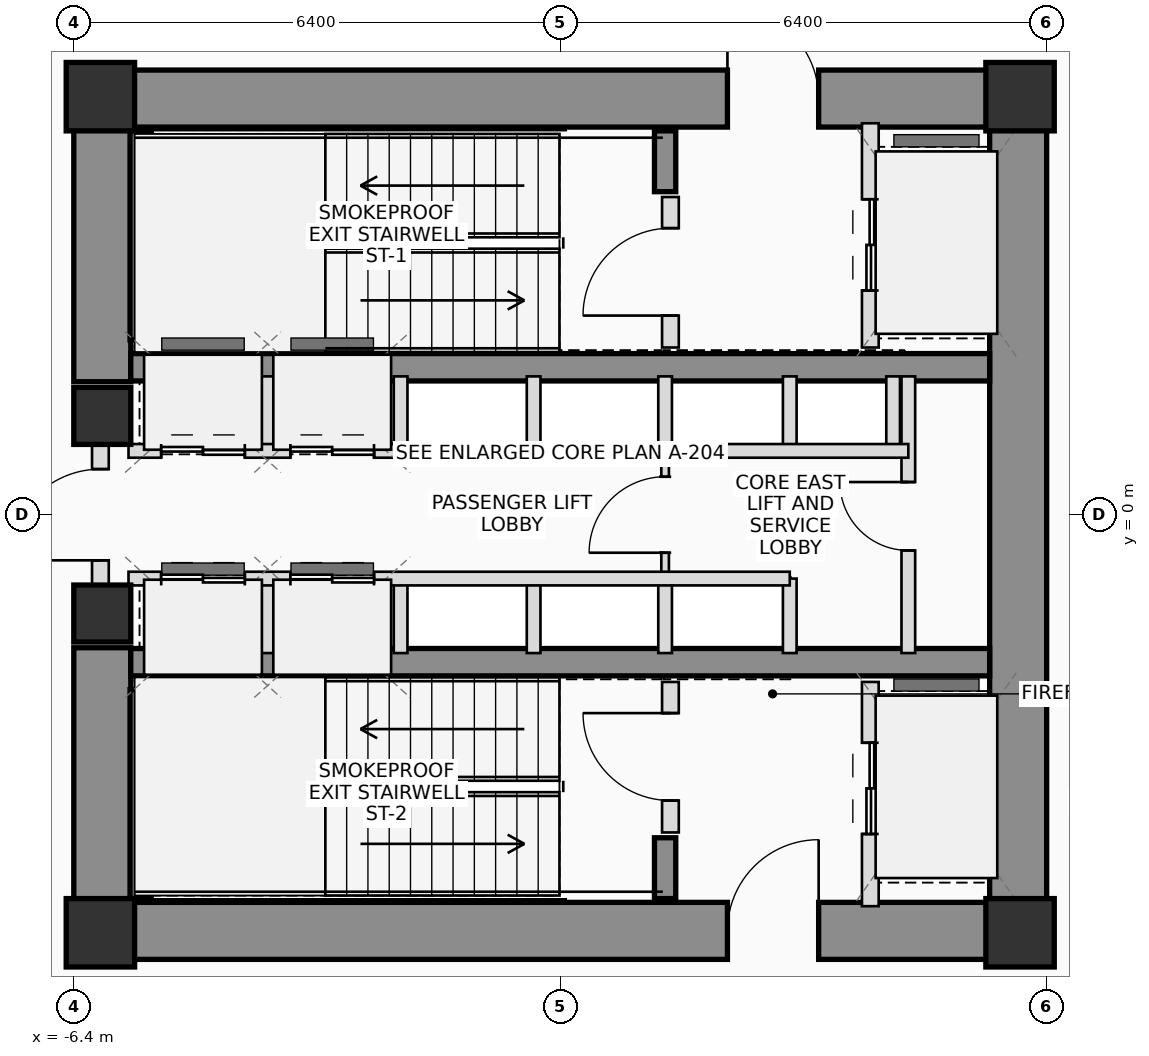
"""IFC4 building model, lengths in metres.
Left out: names, types, materials, properties, quantities, classifications, styles, units other than length and angle.
Written with IfcOpenShell. Run it as: python <this file> out.ifc"""

import sys

from ifc_helpers import new_model, si_unit, direction, frame, frame_2d, origin, origin_2d, place, context, subcontext, project, spatial, rectangle, extrude, source, transform, mapped, element, fill, save


model = new_model("IFC4")
c1 = context("Model", 3, precision=1e-05, world=origin(), true_north=direction((0.0, 1.0)))
c2 = subcontext(c1, "Body", "Model", "MODEL_VIEW")
j1 = project(units=[si_unit("LENGTHUNIT", "METRE"), si_unit("PLANEANGLEUNIT", "RADIAN")], contexts=[c1])
p1 = place(None, origin())
s1 = spatial("IfcSite", under=j1, at=p1, CompositionType="ELEMENT")
p2 = place(p1, origin())
s2 = spatial("IfcBuilding", under=s1, at=p2, CompositionType="ELEMENT")
p3 = place(p2, frame((0.0, 0.0, 31.2)))
s3 = spatial("IfcBuildingStorey", under=s2, at=p3, CompositionType="ELEMENT", Elevation=31.2)
m1 = source(origin(), c2, "Body", "SweptSolid", [
    extrude(rectangle(XDim=0.9, YDim=0.9, at=origin_2d()), origin(), (0.0, 0.0, 1.0), 3.7),
])
for number, where, z_axis, x_axis in (
    (1, (-6.05, -5.5, 0.0), (0.0, 0.0, 1.0), (1.0, 0.0, 0.0)),
    (2, (6.05, -5.5, 0.0), (0.0, 0.0, 1.0), (1.0, 0.0, 0.0)),
    (3, (6.05, 5.5, 0.0), (0.0, 0.0, 1.0), (1.0, 0.0, 0.0)),
    (4, (-6.05, 5.5, 0.0), (0.0, 0.0, 1.0), (1.0, 0.0, 0.0)),
):
    element("IfcColumn", number, at=place(p3, frame(where, z_axis=z_axis, x_axis=x_axis)), inside=s3, PredefinedType="COLUMN", context=c2, shape_type="MappedRepresentation", body=[
        mapped(m1, transform((0.0, 0.0, 0.0), scale=1.0)),
    ])
p4 = place(p3, frame((-6.4, 5.475, 0.0), z_axis=(0.0, 0.0, 1.0), x_axis=(1.0, 0.0, 0.0)))
e5 = element("IfcWall", 5, at=p4, inside=s3, PredefinedType="SHEAR", context=c2, shape_type="SweptSolid", body=[
    extrude(rectangle(XDim=12.8, YDim=0.75, at=frame_2d((6.4, 0.0))), origin(), (0.0, 0.0, 1.0), 3.7),
])
p5 = place(p4, frame((8.6, 0.0, 0.0)))
e6 = element("IfcOpeningElement", 6, at=p5, cuts=e5, PredefinedType="OPENING", context=c2, shape_type="SweptSolid", body=[
    extrude(rectangle(XDim=1.2, YDim=2.2, at=frame_2d((0.6, 1.1))), frame((0.0, 0.385, 0.0), z_axis=(0.0, -1.0, 0.0), x_axis=(1.0, 0.0, 0.0)), (0.0, 0.0, 1.0), 0.77),
])
p6 = place(p3, frame((-6.4, -5.475, 0.0), z_axis=(0.0, 0.0, 1.0), x_axis=(1.0, 0.0, 0.0)))
e7 = element("IfcWall", 7, at=p6, inside=s3, PredefinedType="SHEAR", context=c2, shape_type="SweptSolid", body=[
    extrude(rectangle(XDim=12.8, YDim=0.75, at=frame_2d((6.4, 0.0))), origin(), (0.0, 0.0, 1.0), 3.7),
])
p7 = place(p6, frame((8.6, 0.0, 0.0)))
e8 = element("IfcOpeningElement", 8, at=p7, cuts=e7, PredefinedType="OPENING", context=c2, shape_type="SweptSolid", body=[
    extrude(rectangle(XDim=1.2, YDim=2.2, at=frame_2d((0.6, 1.1))), frame((0.0, 0.385, 0.0), z_axis=(0.0, -1.0, 0.0), x_axis=(1.0, 0.0, 0.0)), (0.0, 0.0, 1.0), 0.77),
])
p8 = place(p3, frame((6.025, -5.1, 0.0), z_axis=(0.0, 0.0, 1.0), x_axis=(0.0, 1.0, 0.0)))
e9 = element("IfcWall", 9, at=p8, inside=s3, PredefinedType="SHEAR", context=c2, shape_type="SweptSolid", body=[
    extrude(rectangle(XDim=10.2, YDim=0.75, at=frame_2d((5.1, 0.0))), origin(), (0.0, 0.0, 1.0), 3.7),
])
for number, where, z_axis, x_axis in (
    (10, (-6.025, -5.1, 0.0), (0.0, 0.0, 1.0), (0.0, 1.0, 0.0)),
    (11, (-6.025, 1.75, 0.0), (0.0, 0.0, 1.0), (0.0, 1.0, 0.0)),
):
    element("IfcWall", number, at=place(p3, frame(where, z_axis=z_axis, x_axis=x_axis)), inside=s3, PredefinedType="SHEAR", context=c2, shape_type="SweptSolid", body=[
        extrude(rectangle(XDim=3.35, YDim=0.75, at=frame_2d((1.675, 0.0))), origin(), (0.0, 0.0, 1.0), 3.7),
    ])
for number, where, z_axis, x_axis in (
    (12, (-5.65, 1.94, 0.0), (0.0, 0.0, 1.0), (1.0, 0.0, 0.0)),
    (13, (-5.65, -1.94, 0.0), (0.0, 0.0, 1.0), (1.0, 0.0, 0.0)),
):
    element("IfcWall", number, at=place(p3, frame(where, z_axis=z_axis, x_axis=x_axis)), inside=s3, PredefinedType="SHEAR", context=c2, shape_type="SweptSolid", body=[
        extrude(rectangle(XDim=11.3, YDim=0.36, at=frame_2d((5.65, 0.0))), origin(), (0.0, 0.0, 1.0), 3.7),
    ])
p9 = place(p3, frame((-5.52, 2.3, 0.0), z_axis=(0.0, 0.0, 1.0), x_axis=(0.0, 1.0, 0.0)))
e14 = element("IfcWall", 14, at=p9, inside=s3, PredefinedType="SHEAR", context=c2, shape_type="SweptSolid", body=[
    extrude(rectangle(XDim=2.75, YDim=0.28, at=frame_2d((1.375, 0.0))), origin(), (0.0, 0.0, 1.0), 3.7),
])
p10 = place(p3, frame((1.38, 4.25, 0.0), z_axis=(0.0, 0.0, 1.0), x_axis=(0.0, 1.0, 0.0)))
e15 = element("IfcWall", 15, at=p10, inside=s3, PredefinedType="SHEAR", context=c2, shape_type="SweptSolid", body=[
    extrude(rectangle(XDim=0.8, YDim=0.28, at=frame_2d((0.4, 0.0))), origin(), (0.0, 0.0, 1.0), 3.7),
])
p11 = place(p3, frame((-5.52, -5.05, 0.0), z_axis=(0.0, 0.0, 1.0), x_axis=(0.0, 1.0, 0.0)))
e16 = element("IfcWall", 16, at=p11, inside=s3, PredefinedType="SHEAR", context=c2, shape_type="SweptSolid", body=[
    extrude(rectangle(XDim=2.75, YDim=0.28, at=frame_2d((1.375, 0.0))), origin(), (0.0, 0.0, 1.0), 3.7),
])
p12 = place(p3, frame((1.38, -5.05, 0.0), z_axis=(0.0, 0.0, 1.0), x_axis=(0.0, 1.0, 0.0)))
e17 = element("IfcWall", 17, at=p12, inside=s3, PredefinedType="SHEAR", context=c2, shape_type="SweptSolid", body=[
    extrude(rectangle(XDim=0.8, YDim=0.28, at=frame_2d((0.4, 0.0))), origin(), (0.0, 0.0, 1.0), 3.7),
])
m2 = source(origin(), c2, "Body", "SweptSolid", [
    extrude(rectangle(XDim=0.75, YDim=0.75, at=origin_2d()), origin(), (0.0, 0.0, 1.0), 3.7),
])
for number, where, z_axis, x_axis in (
    (18, (-6.025, -1.3, 0.0), (0.0, 0.0, 1.0), (1.0, 0.0, 0.0)),
    (19, (-6.025, 1.3, 0.0), (0.0, 0.0, 1.0), (1.0, 0.0, 0.0)),
):
    element("IfcColumn", number, at=place(p3, frame(where, z_axis=z_axis, x_axis=x_axis)), inside=s3, PredefinedType="COLUMN", context=c2, shape_type="MappedRepresentation", body=[
        mapped(m2, transform((0.0, 0.0, 0.0), scale=1.0)),
    ])
p13 = place(p3, frame((-6.05, -0.95, 0.0), z_axis=(0.0, 0.0, 1.0), x_axis=(0.0, 1.0, 0.0)))
e20 = element("IfcWall", 20, at=p13, inside=s3, PredefinedType="PLUMBINGWALL", context=c2, shape_type="SweptSolid", body=[
    extrude(rectangle(XDim=1.9, YDim=0.22, at=frame_2d((0.95, 0.0))), origin(), (0.0, 0.0, 1.0), 2.475),
])
p14 = place(p13, frame((0.35, 0.0, 0.0)))
e21 = element("IfcOpeningElement", 21, at=p14, cuts=e20, PredefinedType="OPENING", context=c2, shape_type="SweptSolid", body=[
    extrude(rectangle(XDim=1.2, YDim=2.2, at=frame_2d((0.6, 1.1))), frame((0.0, 0.12, 0.0), z_axis=(0.0, -1.0, 0.0), x_axis=(1.0, 0.0, 0.0)), (0.0, 0.0, 1.0), 0.24),
])
p15 = place(p3, frame((1.45, 2.2, 0.0), z_axis=(0.0, 0.0, 1.0), x_axis=(0.0, 1.0, 0.0)))
e22 = element("IfcWall", 22, at=p15, inside=s3, PredefinedType="PLUMBINGWALL", context=c2, shape_type="SweptSolid", body=[
    extrude(rectangle(XDim=1.98, YDim=0.22, at=frame_2d((0.99, 0.0))), origin(), (0.0, 0.0, 1.0), 3.495),
])
p16 = place(p15, frame((0.42, 0.0, 0.0)))
e23 = element("IfcOpeningElement", 23, at=p16, cuts=e22, PredefinedType="OPENING", context=c2, shape_type="SweptSolid", body=[
    extrude(rectangle(XDim=1.15, YDim=2.15, at=frame_2d((0.575, 1.075))), frame((0.0, 0.12, 0.0), z_axis=(0.0, -1.0, 0.0), x_axis=(1.0, 0.0, 0.0)), (0.0, 0.0, 1.0), 0.24),
])
p17 = place(p3, frame((4.08, 2.2, 0.0), z_axis=(0.0, 0.0, 1.0), x_axis=(0.0, 1.0, 0.0)))
e24 = element("IfcWall", 24, at=p17, inside=s3, PredefinedType="PLUMBINGWALL", context=c2, shape_type="SweptSolid", body=[
    extrude(rectangle(XDim=2.95, YDim=0.22, at=frame_2d((1.475, 0.0))), origin(), (0.0, 0.0, 1.0), 3.495),
])
p18 = place(p17, frame((0.75, 0.0, 0.0)))
e25 = element("IfcOpeningElement", 25, at=p18, cuts=e24, PredefinedType="OPENING", context=c2, shape_type="SweptSolid", body=[
    extrude(rectangle(XDim=1.2, YDim=2.25, at=frame_2d((0.6, 1.125))), frame((0.0, 0.12, 0.0), z_axis=(0.0, -1.0, 0.0), x_axis=(1.0, 0.0, 0.0)), (0.0, 0.0, 1.0), 0.24),
])
p19 = place(p3, frame((1.45, -4.18, 0.0), z_axis=(0.0, 0.0, 1.0), x_axis=(0.0, 1.0, 0.0)))
e26 = element("IfcWall", 26, at=p19, inside=s3, PredefinedType="PLUMBINGWALL", context=c2, shape_type="SweptSolid", body=[
    extrude(rectangle(XDim=1.98, YDim=0.22, at=frame_2d((0.99, 0.0))), origin(), (0.0, 0.0, 1.0), 3.495),
])
p20 = place(p19, frame((0.42, 0.0, 0.0)))
e27 = element("IfcOpeningElement", 27, at=p20, cuts=e26, PredefinedType="OPENING", context=c2, shape_type="SweptSolid", body=[
    extrude(rectangle(XDim=1.15, YDim=2.15, at=frame_2d((0.575, 1.075))), frame((0.0, 0.12, 0.0), z_axis=(0.0, -1.0, 0.0), x_axis=(1.0, 0.0, 0.0)), (0.0, 0.0, 1.0), 0.24),
])
p21 = place(p3, frame((4.08, -5.15, 0.0), z_axis=(0.0, 0.0, 1.0), x_axis=(0.0, 1.0, 0.0)))
e28 = element("IfcWall", 28, at=p21, inside=s3, PredefinedType="PLUMBINGWALL", context=c2, shape_type="SweptSolid", body=[
    extrude(rectangle(XDim=2.95, YDim=0.22, at=frame_2d((1.475, 0.0))), origin(), (0.0, 0.0, 1.0), 3.495),
])
p22 = place(p21, frame((0.95, 0.0, 0.0)))
e29 = element("IfcOpeningElement", 29, at=p22, cuts=e28, PredefinedType="OPENING", context=c2, shape_type="SweptSolid", body=[
    extrude(rectangle(XDim=1.2, YDim=2.25, at=frame_2d((0.6, 1.125))), frame((0.0, 0.12, 0.0), z_axis=(0.0, -1.0, 0.0), x_axis=(1.0, 0.0, 0.0)), (0.0, 0.0, 1.0), 0.24),
])
p23 = place(p3, frame((1.38, -0.84, 0.0), z_axis=(0.0, 0.0, 1.0), x_axis=(0.0, 1.0, 0.0)))
e30 = element("IfcWall", 30, at=p23, inside=s3, PredefinedType="PARTITIONING", context=c2, shape_type="SweptSolid", body=[
    extrude(rectangle(XDim=1.68, YDim=0.1, at=frame_2d((0.84, 0.0))), origin(), (0.0, 0.0, 1.0), 3.495),
])
p24 = place(p23, frame((0.34, 0.0, 0.0)))
e31 = element("IfcOpeningElement", 31, at=p24, cuts=e30, PredefinedType="OPENING", context=c2, shape_type="SweptSolid", body=[
    extrude(rectangle(XDim=1.0, YDim=2.25, at=frame_2d((0.5, 1.125))), frame((0.0, 0.06, 0.0), z_axis=(0.0, -1.0, 0.0), x_axis=(1.0, 0.0, 0.0)), (0.0, 0.0, 1.0), 0.12),
])
for number, where, z_axis, x_axis in (
    (32, (-3.85, 0.84, 0.0), (0.0, 0.0, 1.0), (0.0, 1.0, 0.0)),
    (33, (-3.85, -1.82, 0.0), (0.0, 0.0, 1.0), (0.0, 1.0, 0.0)),
    (34, (-2.1, 0.84, 0.0), (0.0, 0.0, 1.0), (0.0, 1.0, 0.0)),
    (35, (-2.1, -1.82, 0.0), (0.0, 0.0, 1.0), (0.0, 1.0, 0.0)),
    (36, (-0.35, 0.84, 0.0), (0.0, 0.0, 1.0), (0.0, 1.0, 0.0)),
    (37, (-0.35, -1.82, 0.0), (0.0, 0.0, 1.0), (0.0, 1.0, 0.0)),
    (38, (1.38, 0.84, 0.0), (0.0, 0.0, 1.0), (0.0, 1.0, 0.0)),
    (39, (1.38, -1.82, 0.0), (0.0, 0.0, 1.0), (0.0, 1.0, 0.0)),
    (40, (3.02, 0.84, 0.0), (0.0, 0.0, 1.0), (0.0, 1.0, 0.0)),
    (41, (4.38, 0.84, 0.0), (0.0, 0.0, 1.0), (0.0, 1.0, 0.0)),
    (42, (3.02, -1.82, 0.0), (0.0, 0.0, 1.0), (0.0, 1.0, 0.0)),
):
    element("IfcWall", number, at=place(p3, frame(where, z_axis=z_axis, x_axis=x_axis)), inside=s3, PredefinedType="PLUMBINGWALL", context=c2, shape_type="SweptSolid", body=[
        extrude(rectangle(XDim=0.98, YDim=0.18, at=frame_2d((0.49, 0.0))), origin(), (0.0, 0.0, 1.0), 3.495),
    ])
p25 = place(p3, frame((4.58, -1.82, 0.0), z_axis=(0.0, 0.0, 1.0), x_axis=(0.0, 1.0, 0.0)))
e43 = element("IfcWall", 43, at=p25, inside=s3, PredefinedType="PLUMBINGWALL", context=c2, shape_type="SweptSolid", body=[
    extrude(rectangle(XDim=3.64, YDim=0.18, at=frame_2d((1.82, 0.0))), origin(), (0.0, 0.0, 1.0), 3.495),
])
p26 = place(p25, frame((1.35, 0.0, 0.0)))
e44 = element("IfcOpeningElement", 44, at=p26, cuts=e43, PredefinedType="OPENING", context=c2, shape_type="SweptSolid", body=[
    extrude(rectangle(XDim=0.9, YDim=2.05, at=frame_2d((0.45, 1.025))), frame((0.0, 0.1, 0.0), z_axis=(0.0, -1.0, 0.0), x_axis=(1.0, 0.0, 0.0)), (0.0, 0.0, 1.0), 0.2),
])
p27 = place(p3, frame((-5.68, 0.84, 0.0), z_axis=(0.0, 0.0, 1.0), x_axis=(1.0, 0.0, 0.0)))
e45 = element("IfcWall", 45, at=p27, inside=s3, PredefinedType="PLUMBINGWALL", context=c2, shape_type="SweptSolid", body=[
    extrude(rectangle(XDim=10.26, YDim=0.18, at=frame_2d((5.13, 0.0))), origin(), (0.0, 0.0, 1.0), 3.495),
])
p28 = place(p27, frame((0.43, 0.0, 0.0)))
e46 = element("IfcOpeningElement", 46, at=p28, cuts=e45, PredefinedType="OPENING", context=c2, shape_type="SweptSolid", body=[
    extrude(rectangle(XDim=1.1, YDim=2.2, at=frame_2d((0.55, 1.1))), frame((0.0, 0.1, 0.0), z_axis=(0.0, -1.0, 0.0), x_axis=(1.0, 0.0, 0.0)), (0.0, 0.0, 1.0), 0.2),
])
p29 = place(p27, frame((2.13, 0.0, 0.0)))
e47 = element("IfcOpeningElement", 47, at=p29, cuts=e45, PredefinedType="OPENING", context=c2, shape_type="SweptSolid", body=[
    extrude(rectangle(XDim=1.1, YDim=2.2, at=frame_2d((0.55, 1.1))), frame((0.0, 0.1, 0.0), z_axis=(0.0, -1.0, 0.0), x_axis=(1.0, 0.0, 0.0)), (0.0, 0.0, 1.0), 0.2),
])
p30 = place(p3, frame((-5.68, -0.84, 0.0), z_axis=(0.0, 0.0, 1.0), x_axis=(1.0, 0.0, 0.0)))
e48 = element("IfcWall", 48, at=p30, inside=s3, PredefinedType="PLUMBINGWALL", context=c2, shape_type="SweptSolid", body=[
    extrude(rectangle(XDim=8.7, YDim=0.18, at=frame_2d((4.35, 0.0))), origin(), (0.0, 0.0, 1.0), 3.495),
])
p31 = place(p30, frame((0.43, 0.0, 0.0)))
e49 = element("IfcOpeningElement", 49, at=p31, cuts=e48, PredefinedType="OPENING", context=c2, shape_type="SweptSolid", body=[
    extrude(rectangle(XDim=1.1, YDim=2.2, at=frame_2d((0.55, 1.1))), frame((0.0, 0.1, 0.0), z_axis=(0.0, -1.0, 0.0), x_axis=(1.0, 0.0, 0.0)), (0.0, 0.0, 1.0), 0.2),
])
p32 = place(p30, frame((2.13, 0.0, 0.0)))
e50 = element("IfcOpeningElement", 50, at=p32, cuts=e48, PredefinedType="OPENING", context=c2, shape_type="SweptSolid", body=[
    extrude(rectangle(XDim=1.1, YDim=2.2, at=frame_2d((0.55, 1.1))), frame((0.0, 0.1, 0.0), z_axis=(0.0, -1.0, 0.0), x_axis=(1.0, 0.0, 0.0)), (0.0, 0.0, 1.0), 0.2),
])
p33 = place(p5, origin())
e51 = element("IfcDoor", 51, at=p33, inside=s3, OperationType="SINGLE_SWING_LEFT", PredefinedType="DOOR", context=c2, shape_type="SweptSolid", body=[
    extrude(rectangle(XDim=1.2, YDim=2.2, at=frame_2d((0.6, 1.1))), frame((0.0, 0.025, 0.0), z_axis=(0.0, -1.0, 0.0), x_axis=(1.0, 0.0, 0.0)), (0.0, 0.0, 1.0), 0.05),
])
fill(e6, e51)
p34 = place(p7, origin())
e52 = element("IfcDoor", 52, at=p34, inside=s3, OperationType="SINGLE_SWING_RIGHT", PredefinedType="DOOR", context=c2, shape_type="SweptSolid", body=[
    extrude(rectangle(XDim=1.2, YDim=2.2, at=frame_2d((0.6, 1.1))), frame((0.0, 0.025, 0.0), z_axis=(0.0, -1.0, 0.0), x_axis=(1.0, 0.0, 0.0)), (0.0, 0.0, 1.0), 0.05),
])
fill(e8, e52)
p35 = place(p14, origin())
e53 = element("IfcDoor", 53, at=p35, inside=s3, OperationType="SINGLE_SWING_LEFT", PredefinedType="DOOR", context=c2, shape_type="SweptSolid", body=[
    extrude(rectangle(XDim=1.2, YDim=2.2, at=frame_2d((0.6, 1.1))), frame((0.0, 0.025, 0.0), z_axis=(0.0, -1.0, 0.0), x_axis=(1.0, 0.0, 0.0)), (0.0, 0.0, 1.0), 0.05),
])
fill(e21, e53)
p36 = place(p16, origin())
e54 = element("IfcDoor", 54, at=p36, inside=s3, OperationType="SINGLE_SWING_LEFT", PredefinedType="DOOR", context=c2, shape_type="SweptSolid", body=[
    extrude(rectangle(XDim=1.15, YDim=2.15, at=frame_2d((0.575, 1.075))), frame((0.0, 0.025, 0.0), z_axis=(0.0, -1.0, 0.0), x_axis=(1.0, 0.0, 0.0)), (0.0, 0.0, 1.0), 0.05),
])
fill(e23, e54)
p37 = place(p18, origin())
e55 = element("IfcDoor", 55, at=p37, inside=s3, OperationType="DOUBLE_DOOR_SLIDING", PredefinedType="DOOR", context=c2, shape_type="SweptSolid", body=[
    extrude(rectangle(XDim=1.2, YDim=2.25, at=frame_2d((0.6, 1.125))), frame((0.0, 0.025, 0.0), z_axis=(0.0, -1.0, 0.0), x_axis=(1.0, 0.0, 0.0)), (0.0, 0.0, 1.0), 0.05),
])
fill(e25, e55)
p38 = place(p20, origin())
e56 = element("IfcDoor", 56, at=p38, inside=s3, OperationType="SINGLE_SWING_RIGHT", PredefinedType="DOOR", context=c2, shape_type="SweptSolid", body=[
    extrude(rectangle(XDim=1.15, YDim=2.15, at=frame_2d((0.575, 1.075))), frame((0.0, 0.025, 0.0), z_axis=(0.0, -1.0, 0.0), x_axis=(1.0, 0.0, 0.0)), (0.0, 0.0, 1.0), 0.05),
])
fill(e27, e56)
p39 = place(p22, origin())
e57 = element("IfcDoor", 57, at=p39, inside=s3, OperationType="DOUBLE_DOOR_SLIDING", PredefinedType="DOOR", context=c2, shape_type="SweptSolid", body=[
    extrude(rectangle(XDim=1.2, YDim=2.25, at=frame_2d((0.6, 1.125))), frame((0.0, 0.025, 0.0), z_axis=(0.0, -1.0, 0.0), x_axis=(1.0, 0.0, 0.0)), (0.0, 0.0, 1.0), 0.05),
])
fill(e29, e57)
p40 = place(p24, origin())
e58 = element("IfcDoor", 58, at=p40, inside=s3, OperationType="SINGLE_SWING_LEFT", PredefinedType="DOOR", context=c2, shape_type="SweptSolid", body=[
    extrude(rectangle(XDim=1.0, YDim=2.25, at=frame_2d((0.5, 1.125))), frame((0.0, 0.025, 0.0), z_axis=(0.0, -1.0, 0.0), x_axis=(1.0, 0.0, 0.0)), (0.0, 0.0, 1.0), 0.05),
])
fill(e31, e58)
p41 = place(p26, origin())
e59 = element("IfcDoor", 59, at=p41, inside=s3, OperationType="SINGLE_SWING_RIGHT", PredefinedType="DOOR", context=c2, shape_type="SweptSolid", body=[
    extrude(rectangle(XDim=0.9, YDim=2.05, at=frame_2d((0.45, 1.025))), frame((0.0, 0.025, 0.0), z_axis=(0.0, -1.0, 0.0), x_axis=(1.0, 0.0, 0.0)), (0.0, 0.0, 1.0), 0.05),
])
fill(e44, e59)
p42 = place(p28, origin())
e60 = element("IfcDoor", 60, at=p42, inside=s3, OperationType="DOUBLE_DOOR_SLIDING", PredefinedType="DOOR", context=c2, shape_type="SweptSolid", body=[
    extrude(rectangle(XDim=1.1, YDim=2.2, at=frame_2d((0.55, 1.1))), frame((0.0, 0.025, 0.0), z_axis=(0.0, -1.0, 0.0), x_axis=(1.0, 0.0, 0.0)), (0.0, 0.0, 1.0), 0.05),
])
fill(e46, e60)
p43 = place(p29, origin())
e61 = element("IfcDoor", 61, at=p43, inside=s3, OperationType="DOUBLE_DOOR_SLIDING", PredefinedType="DOOR", context=c2, shape_type="SweptSolid", body=[
    extrude(rectangle(XDim=1.1, YDim=2.2, at=frame_2d((0.55, 1.1))), frame((0.0, 0.025, 0.0), z_axis=(0.0, -1.0, 0.0), x_axis=(1.0, 0.0, 0.0)), (0.0, 0.0, 1.0), 0.05),
])
fill(e47, e61)
p44 = place(p31, origin())
e62 = element("IfcDoor", 62, at=p44, inside=s3, OperationType="DOUBLE_DOOR_SLIDING", PredefinedType="DOOR", context=c2, shape_type="SweptSolid", body=[
    extrude(rectangle(XDim=1.1, YDim=2.2, at=frame_2d((0.55, 1.1))), frame((0.0, 0.025, 0.0), z_axis=(0.0, -1.0, 0.0), x_axis=(1.0, 0.0, 0.0)), (0.0, 0.0, 1.0), 0.05),
])
fill(e49, e62)
p45 = place(p32, origin())
e63 = element("IfcDoor", 63, at=p45, inside=s3, OperationType="DOUBLE_DOOR_SLIDING", PredefinedType="DOOR", context=c2, shape_type="SweptSolid", body=[
    extrude(rectangle(XDim=1.1, YDim=2.2, at=frame_2d((0.55, 1.1))), frame((0.0, 0.025, 0.0), z_axis=(0.0, -1.0, 0.0), x_axis=(1.0, 0.0, 0.0)), (0.0, 0.0, 1.0), 0.05),
])
fill(e50, e63)
save(model, sys.argv[1])
